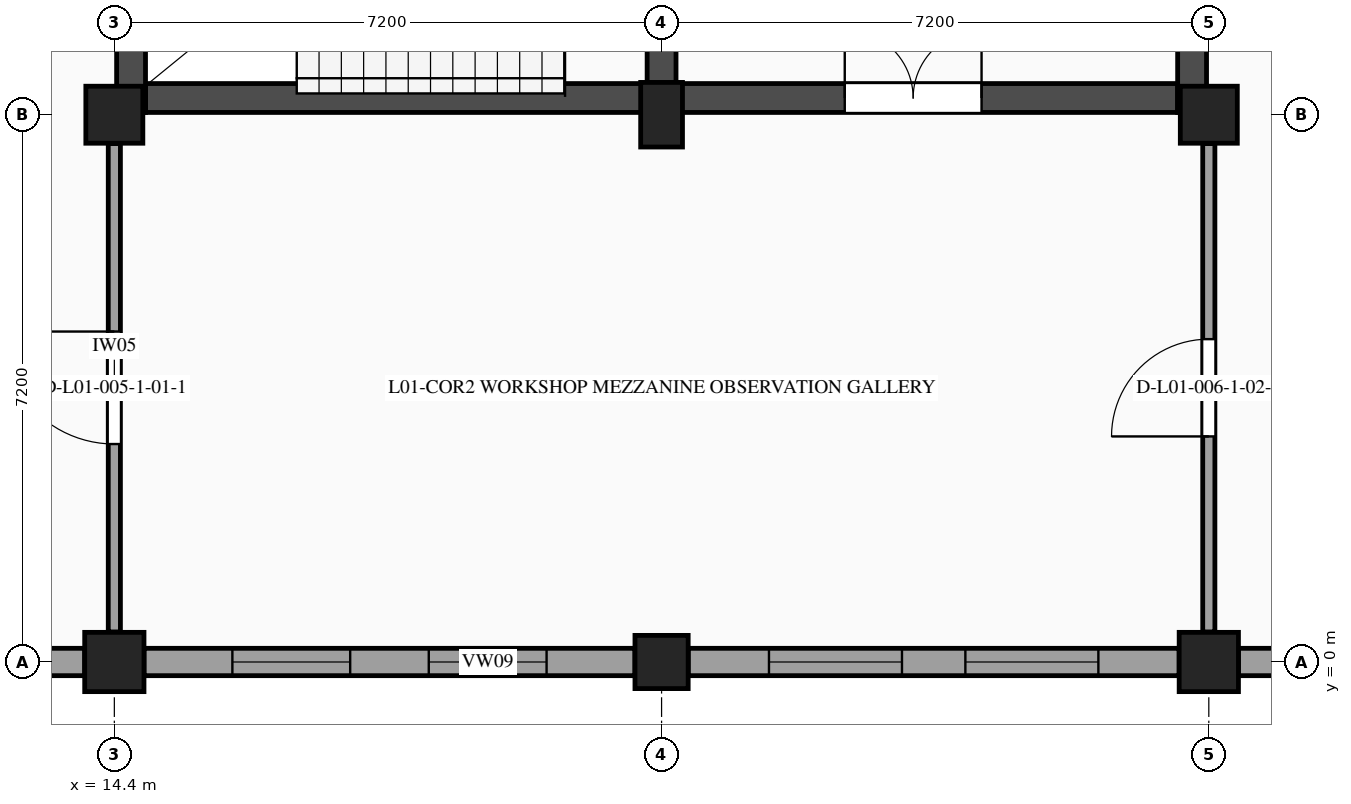
"""IFC4 building model, lengths in metres.
Left out: names, types, materials, properties, quantities, classifications, styles, units other than length and angle.
Written with IfcOpenShell. Run it as: python <this file> out.ifc"""

import sys

from ifc_helpers import new_model, si_unit, direction, frame, frame_2d, origin, origin_2d, place, context, subcontext, project, spatial, rectangle, extrude, element, fill, save


model = new_model("IFC4")
c1 = context("Model", 3, precision=1e-05, world=origin(), true_north=direction((0.0, 1.0)))
c2 = subcontext(c1, "Body", "Model", "MODEL_VIEW")
j1 = project(units=[si_unit("LENGTHUNIT", "METRE"), si_unit("PLANEANGLEUNIT", "RADIAN")], contexts=[c1])
p1 = place(None, origin())
s1 = spatial("IfcSite", under=j1, at=p1, CompositionType="ELEMENT")
p2 = place(p1, origin())
s2 = spatial("IfcBuilding", under=s1, at=p2, CompositionType="ELEMENT")
p3 = place(p2, frame((0.0, 0.0, 5.4)))
s3 = spatial("IfcBuildingStorey", under=s2, at=p3, CompositionType="ELEMENT", Elevation=5.4)
p4 = place(p3, frame((14.4, 0.0, 0.0), z_axis=(0.0, 0.0, 1.0), x_axis=(1.0, 0.0, 0.0)))
e1 = element("IfcColumn", 1, at=p4, inside=s3, PredefinedType="COLUMN", context=c2, shape_type="SweptSolid", body=[
    extrude(rectangle(XDim=0.78, YDim=0.78, at=origin_2d()), origin(), (0.0, 0.0, 1.0), 4.5),
])
p5 = place(p3, frame((14.4, 7.2, 0.0), z_axis=(0.0, 0.0, 1.0), x_axis=(1.0, 0.0, 0.0)))
e2 = element("IfcColumn", 2, at=p5, inside=s3, PredefinedType="COLUMN", context=c2, shape_type="SweptSolid", body=[
    extrude(rectangle(XDim=0.75, YDim=0.75, at=origin_2d()), origin(), (0.0, 0.0, 1.0), 4.5),
])
p6 = place(p3, frame((21.6, 0.0, 0.0), z_axis=(0.0, 0.0, 1.0), x_axis=(1.0, 0.0, 0.0)))
e3 = element("IfcColumn", 3, at=p6, inside=s3, PredefinedType="COLUMN", context=c2, shape_type="SweptSolid", body=[
    extrude(rectangle(XDim=0.7, YDim=0.7, at=origin_2d()), origin(), (0.0, 0.0, 1.0), 4.5),
])
p7 = place(p3, frame((21.6, 7.2, 0.0), z_axis=(0.0, 0.0, 1.0), x_axis=(1.0, 0.0, 0.0)))
e4 = element("IfcColumn", 4, at=p7, inside=s3, PredefinedType="COLUMN", context=c2, shape_type="SweptSolid", body=[
    extrude(rectangle(XDim=0.55, YDim=0.85, at=origin_2d()), origin(), (0.0, 0.0, 1.0), 4.5),
])
p8 = place(p3, frame((28.8, 0.0, 0.0), z_axis=(0.0, 0.0, 1.0), x_axis=(1.0, 0.0, 0.0)))
e5 = element("IfcColumn", 5, at=p8, inside=s3, PredefinedType="COLUMN", context=c2, shape_type="SweptSolid", body=[
    extrude(rectangle(XDim=0.78, YDim=0.78, at=origin_2d()), origin(), (0.0, 0.0, 1.0), 4.5),
])
p9 = place(p3, frame((28.8, 7.2, 0.0), z_axis=(0.0, 0.0, 1.0), x_axis=(1.0, 0.0, 0.0)))
e6 = element("IfcColumn", 6, at=p9, inside=s3, PredefinedType="COLUMN", context=c2, shape_type="SweptSolid", body=[
    extrude(rectangle(XDim=0.75, YDim=0.75, at=origin_2d()), origin(), (0.0, 0.0, 1.0), 4.5),
])
p10 = place(p3, frame((35.65, 0.0, 0.0), z_axis=(0.0, 0.0, 1.0), x_axis=(-1.0, 0.0, 0.0)))
e7 = element("IfcWall", 7, at=p10, inside=s3, PredefinedType="STANDARD", context=c2, shape_type="SweptSolid", body=[
    extrude(rectangle(XDim=6.46, YDim=0.36, at=frame_2d((3.23, 0.0))), origin(), (0.0, 0.0, 1.0), 3.49),
])
p11 = place(p10, frame((0.963, 0.0, 1.15)))
e8 = element("IfcOpeningElement", 8, at=p11, cuts=e7, PredefinedType="OPENING", context=c2, shape_type="SweptSolid", body=[
    extrude(rectangle(XDim=1.95, YDim=1.4, at=frame_2d((0.975, 0.7))), frame((0.0, 0.19, 0.0), z_axis=(0.0, -1.0, 0.0), x_axis=(1.0, 0.0, 0.0)), (0.0, 0.0, 1.0), 0.38),
])
p12 = place(p10, frame((3.547, 0.0, 1.15)))
e9 = element("IfcOpeningElement", 9, at=p12, cuts=e7, PredefinedType="OPENING", context=c2, shape_type="SweptSolid", body=[
    extrude(rectangle(XDim=1.95, YDim=1.4, at=frame_2d((0.975, 0.7))), frame((0.0, 0.19, 0.0), z_axis=(0.0, -1.0, 0.0), x_axis=(1.0, 0.0, 0.0)), (0.0, 0.0, 1.0), 0.38),
])
p13 = place(p3, frame((28.41, 0.0, 0.0), z_axis=(0.0, 0.0, 1.0), x_axis=(-1.0, 0.0, 0.0)))
e10 = element("IfcWall", 10, at=p13, inside=s3, PredefinedType="STANDARD", context=c2, shape_type="SweptSolid", body=[
    extrude(rectangle(XDim=6.46, YDim=0.36, at=frame_2d((3.23, 0.0))), origin(), (0.0, 0.0, 1.0), 3.49),
])
p14 = place(p13, frame((1.063, 0.0, 1.15)))
e11 = element("IfcOpeningElement", 11, at=p14, cuts=e10, PredefinedType="OPENING", context=c2, shape_type="SweptSolid", body=[
    extrude(rectangle(XDim=1.75, YDim=1.4, at=frame_2d((0.875, 0.7))), frame((0.0, 0.19, 0.0), z_axis=(0.0, -1.0, 0.0), x_axis=(1.0, 0.0, 0.0)), (0.0, 0.0, 1.0), 0.38),
])
p15 = place(p13, frame((3.647, 0.0, 1.15)))
e12 = element("IfcOpeningElement", 12, at=p15, cuts=e10, PredefinedType="OPENING", context=c2, shape_type="SweptSolid", body=[
    extrude(rectangle(XDim=1.75, YDim=1.4, at=frame_2d((0.875, 0.7))), frame((0.0, 0.19, 0.0), z_axis=(0.0, -1.0, 0.0), x_axis=(1.0, 0.0, 0.0)), (0.0, 0.0, 1.0), 0.38),
])
p16 = place(p3, frame((21.25, 0.0, 0.0), z_axis=(0.0, 0.0, 1.0), x_axis=(-1.0, 0.0, 0.0)))
e13 = element("IfcWall", 13, at=p16, inside=s3, PredefinedType="STANDARD", context=c2, shape_type="SweptSolid", body=[
    extrude(rectangle(XDim=6.46, YDim=0.36, at=frame_2d((3.23, 0.0))), origin(), (0.0, 0.0, 1.0), 3.49),
])
p17 = place(p16, frame((1.163, 0.0, 1.15)))
e14 = element("IfcOpeningElement", 14, at=p17, cuts=e13, PredefinedType="OPENING", context=c2, shape_type="SweptSolid", body=[
    extrude(rectangle(XDim=1.55, YDim=1.35, at=frame_2d((0.775, 0.675))), frame((0.0, 0.19, 0.0), z_axis=(0.0, -1.0, 0.0), x_axis=(1.0, 0.0, 0.0)), (0.0, 0.0, 1.0), 0.38),
])
p18 = place(p16, frame((3.747, 0.0, 1.15)))
e15 = element("IfcOpeningElement", 15, at=p18, cuts=e13, PredefinedType="OPENING", context=c2, shape_type="SweptSolid", body=[
    extrude(rectangle(XDim=1.55, YDim=1.35, at=frame_2d((0.775, 0.675))), frame((0.0, 0.19, 0.0), z_axis=(0.0, -1.0, 0.0), x_axis=(1.0, 0.0, 0.0)), (0.0, 0.0, 1.0), 0.38),
])
p19 = place(p3, frame((14.01, 0.0, 0.0), z_axis=(0.0, 0.0, 1.0), x_axis=(-1.0, 0.0, 0.0)))
e16 = element("IfcWall", 16, at=p19, inside=s3, PredefinedType="STANDARD", context=c2, shape_type="SweptSolid", body=[
    extrude(rectangle(XDim=6.46, YDim=0.36, at=frame_2d((3.23, 0.0))), origin(), (0.0, 0.0, 1.0), 3.49),
])
p20 = place(p19, frame((1.238, 0.0, 1.15)))
e17 = element("IfcOpeningElement", 17, at=p20, cuts=e16, PredefinedType="OPENING", context=c2, shape_type="SweptSolid", body=[
    extrude(rectangle(XDim=1.4, YDim=1.3, at=frame_2d((0.7, 0.65))), frame((0.0, 0.19, 0.0), z_axis=(0.0, -1.0, 0.0), x_axis=(1.0, 0.0, 0.0)), (0.0, 0.0, 1.0), 0.38),
])
p21 = place(p19, frame((3.822, 0.0, 1.15)))
e18 = element("IfcOpeningElement", 18, at=p21, cuts=e16, PredefinedType="OPENING", context=c2, shape_type="SweptSolid", body=[
    extrude(rectangle(XDim=1.4, YDim=1.3, at=frame_2d((0.7, 0.65))), frame((0.0, 0.19, 0.0), z_axis=(0.0, -1.0, 0.0), x_axis=(1.0, 0.0, 0.0)), (0.0, 0.0, 1.0), 0.38),
])
p22 = place(p3, frame((14.81, 7.42, 0.0), z_axis=(0.0, 0.0, 1.0), x_axis=(1.0, 0.0, 0.0)))
e19 = element("IfcWall", 19, at=p22, inside=s3, PredefinedType="SHEAR", context=c2, shape_type="SweptSolid", body=[
    extrude(rectangle(XDim=6.6, YDim=0.38, at=frame_2d((3.3, 0.0))), origin(), (0.0, 0.0, 1.0), 4.21),
])
p23 = place(p3, frame((14.62, 14.37, 0.0), z_axis=(0.0, 0.0, 1.0), x_axis=(0.0, -1.0, 0.0)))
e20 = element("IfcWall", 20, at=p23, inside=s3, PredefinedType="SHEAR", context=c2, shape_type="SweptSolid", body=[
    extrude(rectangle(XDim=7.14, YDim=0.38, at=frame_2d((3.57, 0.0))), origin(), (0.0, 0.0, 1.0), 4.21),
])
p24 = place(p3, frame((21.6, 7.23, 0.0), z_axis=(0.0, 0.0, 1.0), x_axis=(0.0, 1.0, 0.0)))
e21 = element("IfcWall", 21, at=p24, inside=s3, PredefinedType="SHEAR", context=c2, shape_type="SweptSolid", body=[
    extrude(rectangle(XDim=7.14, YDim=0.38, at=frame_2d((3.57, 0.0))), origin(), (0.0, 0.0, 1.0), 4.21),
])
p25 = place(p24, frame((1.4, 0.0, 0.0)))
e22 = element("IfcOpeningElement", 22, at=p25, cuts=e21, PredefinedType="OPENING", context=c2, shape_type="SweptSolid", body=[
    extrude(rectangle(XDim=1.8, YDim=2.2, at=frame_2d((0.9, 1.1))), frame((0.0, 0.2, 0.0), z_axis=(0.0, -1.0, 0.0), x_axis=(1.0, 0.0, 0.0)), (0.0, 0.0, 1.0), 0.4),
])
p26 = place(p3, frame((21.79, 7.42, 0.0), z_axis=(0.0, 0.0, 1.0), x_axis=(1.0, 0.0, 0.0)))
e23 = element("IfcWall", 23, at=p26, inside=s3, PredefinedType="SHEAR", context=c2, shape_type="SweptSolid", body=[
    extrude(rectangle(XDim=6.6, YDim=0.38, at=frame_2d((3.3, 0.0))), origin(), (0.0, 0.0, 1.0), 4.21),
])
p27 = place(p26, frame((2.22, 0.0, 0.0)))
e24 = element("IfcOpeningElement", 24, at=p27, cuts=e23, PredefinedType="OPENING", context=c2, shape_type="SweptSolid", body=[
    extrude(rectangle(XDim=1.8, YDim=2.2, at=frame_2d((0.9, 1.1))), frame((0.0, 0.2, 0.0), z_axis=(0.0, -1.0, 0.0), x_axis=(1.0, 0.0, 0.0)), (0.0, 0.0, 1.0), 0.4),
])
p28 = place(p3, frame((28.58, 7.23, 0.0), z_axis=(0.0, 0.0, 1.0), x_axis=(0.0, 1.0, 0.0)))
e25 = element("IfcWall", 25, at=p28, inside=s3, PredefinedType="SHEAR", context=c2, shape_type="SweptSolid", body=[
    extrude(rectangle(XDim=7.14, YDim=0.38, at=frame_2d((3.57, 0.0))), origin(), (0.0, 0.0, 1.0), 4.21),
])
p29 = place(p3, frame((14.4, 0.395, 0.0), z_axis=(0.0, 0.0, 1.0), x_axis=(0.0, 1.0, 0.0)))
e26 = element("IfcWall", 26, at=p29, inside=s3, PredefinedType="PARTITIONING", context=c2, shape_type="SweptSolid", body=[
    extrude(rectangle(XDim=6.425, YDim=0.16, at=frame_2d((3.212, 0.0))), origin(), (0.0, 0.0, 1.0), 3.525),
])
p30 = place(p29, frame((2.472, 0.0, 0.0)))
e27 = element("IfcOpeningElement", 27, at=p30, cuts=e26, PredefinedType="OPENING", context=c2, shape_type="SweptSolid", body=[
    extrude(rectangle(XDim=1.48, YDim=2.28, at=frame_2d((0.74, 1.14))), frame((0.0, 0.09, 0.0), z_axis=(0.0, -1.0, 0.0), x_axis=(1.0, 0.0, 0.0)), (0.0, 0.0, 1.0), 0.18),
])
p31 = place(p3, frame((28.8, 0.395, 0.0), z_axis=(0.0, 0.0, 1.0), x_axis=(0.0, 1.0, 0.0)))
e28 = element("IfcWall", 28, at=p31, inside=s3, PredefinedType="PARTITIONING", context=c2, shape_type="SweptSolid", body=[
    extrude(rectangle(XDim=6.425, YDim=0.16, at=frame_2d((3.212, 0.0))), origin(), (0.0, 0.0, 1.0), 3.525),
])
p32 = place(p31, frame((2.573, 0.0, 0.0)))
e29 = element("IfcOpeningElement", 29, at=p32, cuts=e28, PredefinedType="OPENING", context=c2, shape_type="SweptSolid", body=[
    extrude(rectangle(XDim=1.28, YDim=2.24, at=frame_2d((0.64, 1.12))), frame((0.0, 0.09, 0.0), z_axis=(0.0, -1.0, 0.0), x_axis=(1.0, 0.0, 0.0)), (0.0, 0.0, 1.0), 0.18),
])
p33 = place(p14, origin())
e30 = element("IfcWindow", 30, at=p33, inside=s3, PartitioningType="SINGLE_PANEL", PredefinedType="WINDOW", context=c2, shape_type="SweptSolid", body=[
    extrude(rectangle(XDim=1.75, YDim=1.4, at=frame_2d((0.875, 0.7))), frame((0.0, -0.08, 0.0), z_axis=(0.0, -1.0, 0.0), x_axis=(1.0, 0.0, 0.0)), (0.0, 0.0, 1.0), 0.06),
])
fill(e11, e30)
p34 = place(p15, origin())
e31 = element("IfcWindow", 31, at=p34, inside=s3, PartitioningType="SINGLE_PANEL", PredefinedType="WINDOW", context=c2, shape_type="SweptSolid", body=[
    extrude(rectangle(XDim=1.75, YDim=1.4, at=frame_2d((0.875, 0.7))), frame((0.0, -0.08, 0.0), z_axis=(0.0, -1.0, 0.0), x_axis=(1.0, 0.0, 0.0)), (0.0, 0.0, 1.0), 0.06),
])
fill(e12, e31)
p35 = place(p17, origin())
e32 = element("IfcWindow", 32, at=p35, inside=s3, PartitioningType="SINGLE_PANEL", PredefinedType="WINDOW", context=c2, shape_type="SweptSolid", body=[
    extrude(rectangle(XDim=1.55, YDim=1.35, at=frame_2d((0.775, 0.675))), frame((0.0, -0.08, 0.0), z_axis=(0.0, -1.0, 0.0), x_axis=(1.0, 0.0, 0.0)), (0.0, 0.0, 1.0), 0.06),
])
fill(e14, e32)
p36 = place(p18, origin())
e33 = element("IfcWindow", 33, at=p36, inside=s3, PartitioningType="SINGLE_PANEL", PredefinedType="WINDOW", context=c2, shape_type="SweptSolid", body=[
    extrude(rectangle(XDim=1.55, YDim=1.35, at=frame_2d((0.775, 0.675))), frame((0.0, -0.08, 0.0), z_axis=(0.0, -1.0, 0.0), x_axis=(1.0, 0.0, 0.0)), (0.0, 0.0, 1.0), 0.06),
])
fill(e15, e33)
p37 = place(p27, origin())
e34 = element("IfcDoor", 34, at=p37, inside=s3, OperationType="DOUBLE_DOOR_SINGLE_SWING", PredefinedType="DOOR", context=c2, shape_type="SweptSolid", body=[
    extrude(rectangle(XDim=1.8, YDim=2.2, at=frame_2d((0.9, 1.1))), frame((0.0, 0.025, 0.0), z_axis=(0.0, -1.0, 0.0), x_axis=(1.0, 0.0, 0.0)), (0.0, 0.0, 1.0), 0.05),
])
fill(e24, e34)
p38 = place(p30, origin())
e35 = element("IfcDoor", 35, at=p38, inside=s3, OperationType="SINGLE_SWING_RIGHT", PredefinedType="DOOR", context=c2, shape_type="SweptSolid", body=[
    extrude(rectangle(XDim=1.48, YDim=2.28, at=frame_2d((0.74, 1.14))), frame((0.0, 0.025, 0.0), z_axis=(0.0, -1.0, 0.0), x_axis=(1.0, 0.0, 0.0)), (0.0, 0.0, 1.0), 0.05),
])
fill(e27, e35)
p39 = place(p32, origin())
e36 = element("IfcDoor", 36, at=p39, inside=s3, OperationType="SINGLE_SWING_LEFT", PredefinedType="DOOR", context=c2, shape_type="SweptSolid", body=[
    extrude(rectangle(XDim=1.28, YDim=2.24, at=frame_2d((0.64, 1.12))), frame((0.0, 0.025, 0.0), z_axis=(0.0, -1.0, 0.0), x_axis=(1.0, 0.0, 0.0)), (0.0, 0.0, 1.0), 0.05),
])
fill(e29, e36)
save(model, sys.argv[1])
